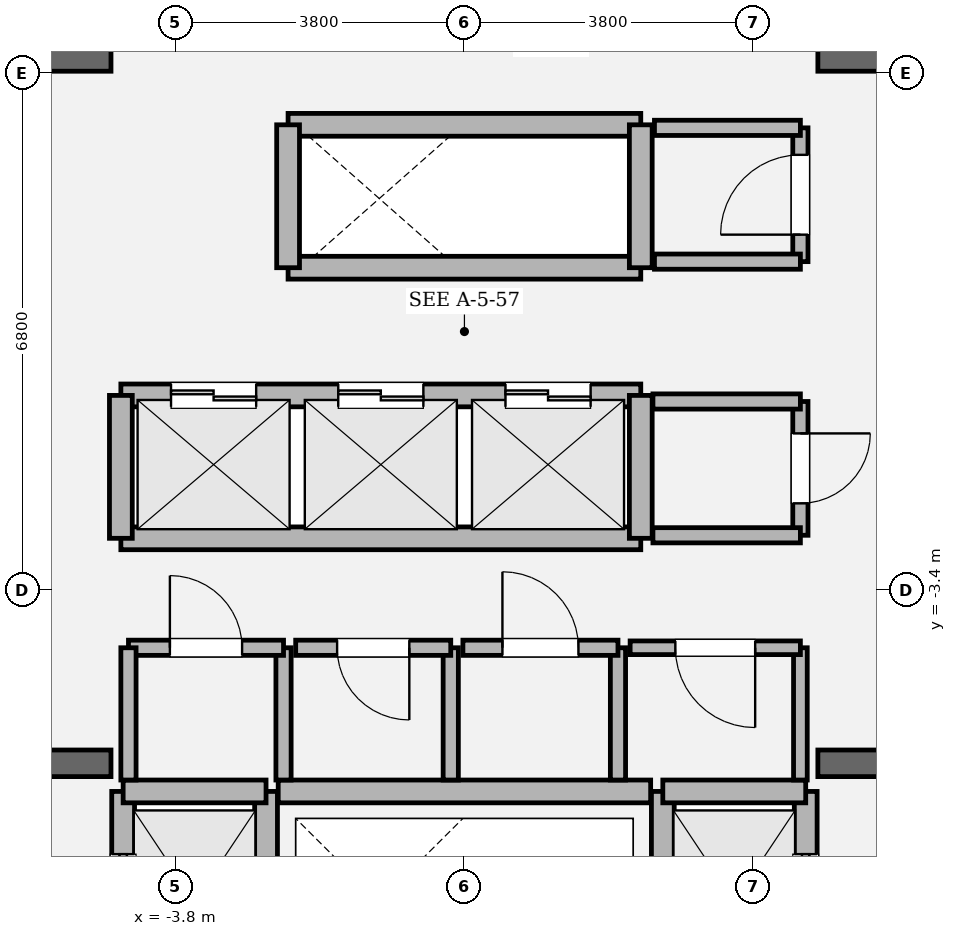
"""IFC4 building model, lengths in metres.
Left out: names, types, materials, properties, quantities, classifications, styles, units other than length and angle.
Written with IfcOpenShell. Run it as: python <this file> out.ifc"""

import sys

from ifc_helpers import new_model, si_unit, direction, frame, frame_2d, origin, place, context, subcontext, project, spatial, rectangle, extrude, element, fill, save


model = new_model("IFC4")
c1 = context("Model", 3, precision=1e-05, world=origin(), true_north=direction((0.0, 1.0)))
c2 = subcontext(c1, "Body", "Model", "MODEL_VIEW")
j1 = project(units=[si_unit("LENGTHUNIT", "METRE"), si_unit("PLANEANGLEUNIT", "RADIAN")], contexts=[c1])
p1 = place(None, origin())
s1 = spatial("IfcSite", under=j1, at=p1, CompositionType="ELEMENT")
p2 = place(p1, origin())
s2 = spatial("IfcBuilding", under=s1, at=p2, CompositionType="ELEMENT")
p3 = place(p2, frame((0.0, 0.0, 279.75)))
s3 = spatial("IfcBuildingStorey", under=s2, at=p3, CompositionType="ELEMENT", Elevation=279.75)
p4 = place(p3, frame((-9.925, -5.68, 0.0), z_axis=(0.0, 0.0, 1.0), x_axis=(1.0, 0.0, 0.0)))
e1 = element("IfcWall", 1, at=p4, inside=s3, PredefinedType="SOLIDWALL", context=c2, shape_type="SweptSolid", body=[
    extrude(rectangle(XDim=5.275, YDim=0.35, at=frame_2d((2.638, 0.0))), origin(), (0.0, 0.0, 1.0), 4.05),
])
p5 = place(p4, frame((1.385, 0.0, 0.0)))
e2 = element("IfcOpeningElement", 2, at=p5, cuts=e1, PredefinedType="OPENING", context=c2, shape_type="SweptSolid", body=[
    extrude(rectangle(XDim=1.18, YDim=2.2, at=frame_2d((0.59, 1.1))), frame((0.0, 0.185, 0.0), z_axis=(0.0, -1.0, 0.0), x_axis=(1.0, 0.0, 0.0)), (0.0, 0.0, 1.0), 0.37),
])
p6 = place(p3, frame((4.65, -5.68, 0.0), z_axis=(0.0, 0.0, 1.0), x_axis=(1.0, 0.0, 0.0)))
e3 = element("IfcWall", 3, at=p6, inside=s3, PredefinedType="SOLIDWALL", context=c2, shape_type="SweptSolid", body=[
    extrude(rectangle(XDim=5.275, YDim=0.35, at=frame_2d((2.638, 0.0))), origin(), (0.0, 0.0, 1.0), 4.05),
])
p7 = place(p6, frame((2.71, 0.0, 0.0)))
e4 = element("IfcOpeningElement", 4, at=p7, cuts=e3, PredefinedType="OPENING", context=c2, shape_type="SweptSolid", body=[
    extrude(rectangle(XDim=1.18, YDim=2.2, at=frame_2d((0.59, 1.1))), frame((0.0, 0.185, 0.0), z_axis=(0.0, -1.0, 0.0), x_axis=(1.0, 0.0, 0.0)), (0.0, 0.0, 1.0), 0.37),
])
for number, where, z_axis, x_axis in (
    (5, (-9.925, 3.6, 0.0), (0.0, 0.0, 1.0), (1.0, 0.0, 0.0)),
    (6, (4.65, 3.6, 0.0), (0.0, 0.0, 1.0), (1.0, 0.0, 0.0)),
):
    element("IfcWall", number, at=place(p3, frame(where, z_axis=z_axis, x_axis=x_axis)), inside=s3, PredefinedType="SOLIDWALL", context=c2, shape_type="SweptSolid", body=[
        extrude(rectangle(XDim=5.275, YDim=0.35, at=frame_2d((2.638, 0.0))), origin(), (0.0, 0.0, 1.0), 4.05),
    ])
p8 = place(p3, frame((-4.49, -8.82, 0.0), z_axis=(0.0, 0.0, 1.0), x_axis=(0.0, 1.0, 0.0)))
e7 = element("IfcWall", 7, at=p8, inside=s3, PredefinedType="SOLIDWALL", context=c2, shape_type="SweptSolid", body=[
    extrude(rectangle(XDim=2.77, YDim=0.3, at=frame_2d((1.385, 0.0))), origin(), (0.0, 0.0, 1.0), 3.77),
])
p9 = place(p8, frame((0.825, 0.0, 0.0)))
e8 = element("IfcOpeningElement", 8, at=p9, cuts=e7, PredefinedType="OPENING", context=c2, shape_type="SweptSolid", body=[
    extrude(rectangle(XDim=1.12, YDim=2.25, at=frame_2d((0.56, 1.125))), frame((0.0, 0.16, 0.0), z_axis=(0.0, -1.0, 0.0), x_axis=(1.0, 0.0, 0.0)), (0.0, 0.0, 1.0), 0.32),
])
p10 = place(p3, frame((-2.61, -8.82, 0.0), z_axis=(0.0, 0.0, 1.0), x_axis=(0.0, 1.0, 0.0)))
e9 = element("IfcWall", 9, at=p10, inside=s3, PredefinedType="SOLIDWALL", context=c2, shape_type="SweptSolid", body=[
    extrude(rectangle(XDim=2.77, YDim=0.3, at=frame_2d((1.385, 0.0))), origin(), (0.0, 0.0, 1.0), 3.77),
])
p11 = place(p3, frame((-4.49, -6.05, 0.0), z_axis=(0.0, 0.0, 1.0), x_axis=(1.0, 0.0, 0.0)))
e10 = element("IfcWall", 10, at=p11, inside=s3, PredefinedType="SOLIDWALL", context=c2, shape_type="SweptSolid", body=[
    extrude(rectangle(XDim=1.88, YDim=0.3, at=frame_2d((0.94, 0.0))), origin(), (0.0, 0.0, 1.0), 3.77),
])
p12 = place(p3, frame((4.49, -8.82, 0.0), z_axis=(0.0, 0.0, 1.0), x_axis=(0.0, 1.0, 0.0)))
e11 = element("IfcWall", 11, at=p12, inside=s3, PredefinedType="SOLIDWALL", context=c2, shape_type="SweptSolid", body=[
    extrude(rectangle(XDim=2.77, YDim=0.3, at=frame_2d((1.385, 0.0))), origin(), (0.0, 0.0, 1.0), 3.77),
])
p13 = place(p12, frame((0.825, 0.0, 0.0)))
e12 = element("IfcOpeningElement", 12, at=p13, cuts=e11, PredefinedType="OPENING", context=c2, shape_type="SweptSolid", body=[
    extrude(rectangle(XDim=1.12, YDim=2.25, at=frame_2d((0.56, 1.125))), frame((0.0, 0.16, 0.0), z_axis=(0.0, -1.0, 0.0), x_axis=(1.0, 0.0, 0.0)), (0.0, 0.0, 1.0), 0.32),
])
p14 = place(p3, frame((2.61, -8.82, 0.0), z_axis=(0.0, 0.0, 1.0), x_axis=(0.0, 1.0, 0.0)))
e13 = element("IfcWall", 13, at=p14, inside=s3, PredefinedType="SOLIDWALL", context=c2, shape_type="SweptSolid", body=[
    extrude(rectangle(XDim=2.77, YDim=0.3, at=frame_2d((1.385, 0.0))), origin(), (0.0, 0.0, 1.0), 3.77),
])
p15 = place(p3, frame((2.61, -6.05, 0.0), z_axis=(0.0, 0.0, 1.0), x_axis=(1.0, 0.0, 0.0)))
e14 = element("IfcWall", 14, at=p15, inside=s3, PredefinedType="SOLIDWALL", context=c2, shape_type="SweptSolid", body=[
    extrude(rectangle(XDim=1.88, YDim=0.3, at=frame_2d((0.94, 0.0))), origin(), (0.0, 0.0, 1.0), 3.77),
])
p16 = place(p3, frame((-4.52, -0.84, 0.0), z_axis=(0.0, 0.0, 1.0), x_axis=(1.0, 0.0, 0.0)))
e15 = element("IfcWall", 15, at=p16, inside=s3, PredefinedType="SOLIDWALL", context=c2, shape_type="SweptSolid", body=[
    extrude(rectangle(XDim=6.84, YDim=0.3, at=frame_2d((3.42, 0.0))), origin(), (0.0, 0.0, 1.0), 3.77),
])
p17 = place(p16, frame((0.66, 0.0, 0.0)))
e16 = element("IfcOpeningElement", 16, at=p17, cuts=e15, PredefinedType="OPENING", context=c2, shape_type="SweptSolid", body=[
    extrude(rectangle(XDim=1.12, YDim=2.25, at=frame_2d((0.56, 1.125))), frame((0.0, 0.16, 0.0), z_axis=(0.0, -1.0, 0.0), x_axis=(1.0, 0.0, 0.0)), (0.0, 0.0, 1.0), 0.32),
])
p18 = place(p16, frame((2.86, 0.0, 0.0)))
e17 = element("IfcOpeningElement", 17, at=p18, cuts=e15, PredefinedType="OPENING", context=c2, shape_type="SweptSolid", body=[
    extrude(rectangle(XDim=1.12, YDim=2.25, at=frame_2d((0.56, 1.125))), frame((0.0, 0.16, 0.0), z_axis=(0.0, -1.0, 0.0), x_axis=(1.0, 0.0, 0.0)), (0.0, 0.0, 1.0), 0.32),
])
p19 = place(p16, frame((5.06, 0.0, 0.0)))
e18 = element("IfcOpeningElement", 18, at=p19, cuts=e15, PredefinedType="OPENING", context=c2, shape_type="SweptSolid", body=[
    extrude(rectangle(XDim=1.12, YDim=2.25, at=frame_2d((0.56, 1.125))), frame((0.0, 0.16, 0.0), z_axis=(0.0, -1.0, 0.0), x_axis=(1.0, 0.0, 0.0)), (0.0, 0.0, 1.0), 0.32),
])
p20 = place(p3, frame((-4.52, -2.72, 0.0), z_axis=(0.0, 0.0, 1.0), x_axis=(1.0, 0.0, 0.0)))
e19 = element("IfcWall", 19, at=p20, inside=s3, PredefinedType="SOLIDWALL", context=c2, shape_type="SweptSolid", body=[
    extrude(rectangle(XDim=6.84, YDim=0.3, at=frame_2d((3.42, 0.0))), origin(), (0.0, 0.0, 1.0), 3.77),
])
for number, where, z_axis, x_axis in (
    (20, (-4.52, -2.72, 0.0), (0.0, 0.0, 1.0), (0.0, 1.0, 0.0)),
    (21, (2.32, -2.72, 0.0), (0.0, 0.0, 1.0), (0.0, 1.0, 0.0)),
):
    element("IfcWall", number, at=place(p3, frame(where, z_axis=z_axis, x_axis=x_axis)), inside=s3, PredefinedType="SOLIDWALL", context=c2, shape_type="SweptSolid", body=[
        extrude(rectangle(XDim=1.88, YDim=0.3, at=frame_2d((0.94, 0.0))), origin(), (0.0, 0.0, 1.0), 3.77),
    ])
for number, where, z_axis, x_axis in (
    (22, (-2.32, 0.84, 0.0), (0.0, 0.0, 1.0), (1.0, 0.0, 0.0)),
    (23, (-2.32, 2.72, 0.0), (0.0, 0.0, 1.0), (1.0, 0.0, 0.0)),
):
    element("IfcWall", number, at=place(p3, frame(where, z_axis=z_axis, x_axis=x_axis)), inside=s3, PredefinedType="SOLIDWALL", context=c2, shape_type="SweptSolid", body=[
        extrude(rectangle(XDim=4.64, YDim=0.3, at=frame_2d((2.32, 0.0))), origin(), (0.0, 0.0, 1.0), 3.77),
    ])
for number, where, z_axis, x_axis in (
    (24, (-2.32, 0.84, 0.0), (0.0, 0.0, 1.0), (0.0, 1.0, 0.0)),
    (25, (2.32, 0.84, 0.0), (0.0, 0.0, 1.0), (0.0, 1.0, 0.0)),
):
    element("IfcWall", number, at=place(p3, frame(where, z_axis=z_axis, x_axis=x_axis)), inside=s3, PredefinedType="SOLIDWALL", context=c2, shape_type="SweptSolid", body=[
        extrude(rectangle(XDim=1.88, YDim=0.3, at=frame_2d((0.94, 0.0))), origin(), (0.0, 0.0, 1.0), 3.77),
    ])
p21 = place(p3, frame((-2.45, -6.05, 0.0), z_axis=(0.0, 0.0, 1.0), x_axis=(1.0, 0.0, 0.0)))
e26 = element("IfcWall", 26, at=p21, inside=s3, PredefinedType="SOLIDWALL", context=c2, shape_type="SweptSolid", body=[
    extrude(rectangle(XDim=4.9, YDim=0.3, at=frame_2d((2.45, 0.0))), origin(), (0.0, 0.0, 1.0), 3.77),
])
p22 = place(p3, frame((-2.38, -5.9, 0.0), z_axis=(0.0, 0.0, 1.0), x_axis=(0.0, 1.0, 0.0)))
e27 = element("IfcWall", 27, at=p22, inside=s3, PredefinedType="SOLIDWALL", context=c2, shape_type="SweptSolid", body=[
    extrude(rectangle(XDim=1.74, YDim=0.2, at=frame_2d((0.87, 0.0))), origin(), (0.0, 0.0, 1.0), 3.77),
])
p23 = place(p3, frame((-2.38, -4.16, 0.0), z_axis=(0.0, 0.0, 1.0), x_axis=(-1.0, 0.0, 0.0)))
e28 = element("IfcWall", 28, at=p23, inside=s3, PredefinedType="SOLIDWALL", context=c2, shape_type="SweptSolid", body=[
    extrude(rectangle(XDim=2.04, YDim=0.2, at=frame_2d((1.02, 0.0))), origin(), (0.0, 0.0, 1.0), 3.77),
])
p24 = place(p23, frame((0.545, 0.0, 0.0)))
e29 = element("IfcOpeningElement", 29, at=p24, cuts=e28, PredefinedType="OPENING", context=c2, shape_type="SweptSolid", body=[
    extrude(rectangle(XDim=0.95, YDim=2.15, at=frame_2d((0.475, 1.075))), frame((0.0, 0.11, 0.0), z_axis=(0.0, -1.0, 0.0), x_axis=(1.0, 0.0, 0.0)), (0.0, 0.0, 1.0), 0.22),
])
for number, where, z_axis, x_axis in (
    (30, (-4.42, -4.16, 0.0), (0.0, 0.0, 1.0), (0.0, -1.0, 0.0)),
    (31, (-0.18, -5.9, 0.0), (0.0, 0.0, 1.0), (0.0, 1.0, 0.0)),
):
    element("IfcWall", number, at=place(p3, frame(where, z_axis=z_axis, x_axis=x_axis)), inside=s3, PredefinedType="SOLIDWALL", context=c2, shape_type="SweptSolid", body=[
        extrude(rectangle(XDim=1.74, YDim=0.2, at=frame_2d((0.87, 0.0))), origin(), (0.0, 0.0, 1.0), 3.77),
    ])
p25 = place(p3, frame((-0.18, -4.16, 0.0), z_axis=(0.0, 0.0, 1.0), x_axis=(-1.0, 0.0, 0.0)))
e32 = element("IfcWall", 32, at=p25, inside=s3, PredefinedType="SOLIDWALL", context=c2, shape_type="SweptSolid", body=[
    extrude(rectangle(XDim=2.04, YDim=0.2, at=frame_2d((1.02, 0.0))), origin(), (0.0, 0.0, 1.0), 3.77),
])
p26 = place(p25, frame((0.545, 0.0, 0.0)))
e33 = element("IfcOpeningElement", 33, at=p26, cuts=e32, PredefinedType="OPENING", context=c2, shape_type="SweptSolid", body=[
    extrude(rectangle(XDim=0.95, YDim=2.15, at=frame_2d((0.475, 1.075))), frame((0.0, 0.11, 0.0), z_axis=(0.0, -1.0, 0.0), x_axis=(1.0, 0.0, 0.0)), (0.0, 0.0, 1.0), 0.22),
])
p27 = place(p3, frame((2.02, -5.9, 0.0), z_axis=(0.0, 0.0, 1.0), x_axis=(0.0, 1.0, 0.0)))
e34 = element("IfcWall", 34, at=p27, inside=s3, PredefinedType="SOLIDWALL", context=c2, shape_type="SweptSolid", body=[
    extrude(rectangle(XDim=1.74, YDim=0.2, at=frame_2d((0.87, 0.0))), origin(), (0.0, 0.0, 1.0), 3.77),
])
p28 = place(p3, frame((2.02, -4.16, 0.0), z_axis=(0.0, 0.0, 1.0), x_axis=(-1.0, 0.0, 0.0)))
e35 = element("IfcWall", 35, at=p28, inside=s3, PredefinedType="SOLIDWALL", context=c2, shape_type="SweptSolid", body=[
    extrude(rectangle(XDim=2.04, YDim=0.2, at=frame_2d((1.02, 0.0))), origin(), (0.0, 0.0, 1.0), 3.77),
])
p29 = place(p28, frame((0.52, 0.0, 0.0)))
e36 = element("IfcOpeningElement", 36, at=p29, cuts=e35, PredefinedType="OPENING", context=c2, shape_type="SweptSolid", body=[
    extrude(rectangle(XDim=1.0, YDim=2.15, at=frame_2d((0.5, 1.075))), frame((0.0, 0.11, 0.0), z_axis=(0.0, -1.0, 0.0), x_axis=(1.0, 0.0, 0.0)), (0.0, 0.0, 1.0), 0.22),
])
p30 = place(p3, frame((4.42, -5.9, 0.0), z_axis=(0.0, 0.0, 1.0), x_axis=(0.0, 1.0, 0.0)))
e37 = element("IfcWall", 37, at=p30, inside=s3, PredefinedType="PARTITIONING", context=c2, shape_type="SweptSolid", body=[
    extrude(rectangle(XDim=1.74, YDim=0.18, at=frame_2d((0.87, 0.0))), origin(), (0.0, 0.0, 1.0), 3.77),
])
p31 = place(p3, frame((4.42, -4.16, 0.0), z_axis=(0.0, 0.0, 1.0), x_axis=(-1.0, 0.0, 0.0)))
e38 = element("IfcWall", 38, at=p31, inside=s3, PredefinedType="PARTITIONING", context=c2, shape_type="SweptSolid", body=[
    extrude(rectangle(XDim=2.24, YDim=0.18, at=frame_2d((1.12, 0.0))), origin(), (0.0, 0.0, 1.0), 3.77),
])
p32 = place(p31, frame((0.595, 0.0, 0.0)))
e39 = element("IfcOpeningElement", 39, at=p32, cuts=e38, PredefinedType="OPENING", context=c2, shape_type="SweptSolid", body=[
    extrude(rectangle(XDim=1.05, YDim=2.2, at=frame_2d((0.525, 1.1))), frame((0.0, 0.1, 0.0), z_axis=(0.0, -1.0, 0.0), x_axis=(1.0, 0.0, 0.0)), (0.0, 0.0, 1.0), 0.2),
])
p33 = place(p3, frame((4.42, -2.68, 0.0), z_axis=(0.0, 0.0, 1.0), x_axis=(0.0, 1.0, 0.0)))
e40 = element("IfcWall", 40, at=p33, inside=s3, PredefinedType="SOLIDWALL", context=c2, shape_type="SweptSolid", body=[
    extrude(rectangle(XDim=1.76, YDim=0.2, at=frame_2d((0.88, 0.0))), origin(), (0.0, 0.0, 1.0), 3.77),
])
p34 = place(p33, frame((0.42, 0.0, 0.0)))
e41 = element("IfcOpeningElement", 41, at=p34, cuts=e40, PredefinedType="OPENING", context=c2, shape_type="SweptSolid", body=[
    extrude(rectangle(XDim=0.92, YDim=2.1, at=frame_2d((0.46, 1.05))), frame((0.0, 0.11, 0.0), z_axis=(0.0, -1.0, 0.0), x_axis=(1.0, 0.0, 0.0)), (0.0, 0.0, 1.0), 0.22),
])
for number, where, z_axis, x_axis in (
    (42, (4.42, -0.92, 0.0), (0.0, 0.0, 1.0), (-1.0, 0.0, 0.0)),
    (43, (2.48, -2.68, 0.0), (0.0, 0.0, 1.0), (1.0, 0.0, 0.0)),
):
    element("IfcWall", number, at=place(p3, frame(where, z_axis=z_axis, x_axis=x_axis)), inside=s3, PredefinedType="SOLIDWALL", context=c2, shape_type="SweptSolid", body=[
        extrude(rectangle(XDim=1.94, YDim=0.2, at=frame_2d((0.97, 0.0))), origin(), (0.0, 0.0, 1.0), 3.77),
    ])
p35 = place(p3, frame((4.42, 0.92, 0.0), z_axis=(0.0, 0.0, 1.0), x_axis=(0.0, 1.0, 0.0)))
e44 = element("IfcWall", 44, at=p35, inside=s3, PredefinedType="SOLIDWALL", context=c2, shape_type="SweptSolid", body=[
    extrude(rectangle(XDim=1.76, YDim=0.2, at=frame_2d((0.88, 0.0))), origin(), (0.0, 0.0, 1.0), 3.77),
])
p36 = place(p35, frame((0.355, 0.0, 0.0)))
e45 = element("IfcOpeningElement", 45, at=p36, cuts=e44, PredefinedType="OPENING", context=c2, shape_type="SweptSolid", body=[
    extrude(rectangle(XDim=1.05, YDim=2.2, at=frame_2d((0.525, 1.1))), frame((0.0, 0.11, 0.0), z_axis=(0.0, -1.0, 0.0), x_axis=(1.0, 0.0, 0.0)), (0.0, 0.0, 1.0), 0.22),
])
for number, where, z_axis, x_axis in (
    (46, (4.42, 2.68, 0.0), (0.0, 0.0, 1.0), (-1.0, 0.0, 0.0)),
    (47, (2.5, 0.92, 0.0), (0.0, 0.0, 1.0), (1.0, 0.0, 0.0)),
):
    element("IfcWall", number, at=place(p3, frame(where, z_axis=z_axis, x_axis=x_axis)), inside=s3, PredefinedType="SOLIDWALL", context=c2, shape_type="SweptSolid", body=[
        extrude(rectangle(XDim=1.92, YDim=0.2, at=frame_2d((0.96, 0.0))), origin(), (0.0, 0.0, 1.0), 3.77),
    ])
p37 = place(p9, origin())
e48 = element("IfcDoor", 48, at=p37, inside=s3, OperationType="SLIDING_TO_LEFT", PredefinedType="DOOR", context=c2, shape_type="SweptSolid", body=[
    extrude(rectangle(XDim=1.12, YDim=2.25, at=frame_2d((0.56, 1.125))), frame((0.0, 0.025, 0.0), z_axis=(0.0, -1.0, 0.0), x_axis=(1.0, 0.0, 0.0)), (0.0, 0.0, 1.0), 0.05),
])
fill(e8, e48)
p38 = place(p13, origin())
e49 = element("IfcDoor", 49, at=p38, inside=s3, OperationType="SLIDING_TO_RIGHT", PredefinedType="DOOR", context=c2, shape_type="SweptSolid", body=[
    extrude(rectangle(XDim=1.12, YDim=2.25, at=frame_2d((0.56, 1.125))), frame((0.0, 0.025, 0.0), z_axis=(0.0, -1.0, 0.0), x_axis=(1.0, 0.0, 0.0)), (0.0, 0.0, 1.0), 0.05),
])
fill(e12, e49)
p39 = place(p17, origin())
e50 = element("IfcDoor", 50, at=p39, inside=s3, OperationType="DOUBLE_DOOR_SLIDING", PredefinedType="DOOR", context=c2, shape_type="SweptSolid", body=[
    extrude(rectangle(XDim=1.12, YDim=2.25, at=frame_2d((0.56, 1.125))), frame((0.0, 0.025, 0.0), z_axis=(0.0, -1.0, 0.0), x_axis=(1.0, 0.0, 0.0)), (0.0, 0.0, 1.0), 0.05),
])
fill(e16, e50)
p40 = place(p18, origin())
e51 = element("IfcDoor", 51, at=p40, inside=s3, OperationType="DOUBLE_DOOR_SLIDING", PredefinedType="DOOR", context=c2, shape_type="SweptSolid", body=[
    extrude(rectangle(XDim=1.12, YDim=2.25, at=frame_2d((0.56, 1.125))), frame((0.0, 0.025, 0.0), z_axis=(0.0, -1.0, 0.0), x_axis=(1.0, 0.0, 0.0)), (0.0, 0.0, 1.0), 0.05),
])
fill(e17, e51)
p41 = place(p19, origin())
e52 = element("IfcDoor", 52, at=p41, inside=s3, OperationType="DOUBLE_DOOR_SLIDING", PredefinedType="DOOR", context=c2, shape_type="SweptSolid", body=[
    extrude(rectangle(XDim=1.12, YDim=2.25, at=frame_2d((0.56, 1.125))), frame((0.0, 0.025, 0.0), z_axis=(0.0, -1.0, 0.0), x_axis=(1.0, 0.0, 0.0)), (0.0, 0.0, 1.0), 0.05),
])
fill(e18, e52)
p42 = place(p24, origin())
e53 = element("IfcDoor", 53, at=p42, inside=s3, OperationType="SINGLE_SWING_RIGHT", PredefinedType="DOOR", context=c2, shape_type="SweptSolid", body=[
    extrude(rectangle(XDim=0.95, YDim=2.15, at=frame_2d((0.475, 1.075))), frame((0.0, 0.025, 0.0), z_axis=(0.0, -1.0, 0.0), x_axis=(1.0, 0.0, 0.0)), (0.0, 0.0, 1.0), 0.05),
])
fill(e29, e53)
p43 = place(p26, origin())
e54 = element("IfcDoor", 54, at=p43, inside=s3, OperationType="SINGLE_SWING_LEFT", PredefinedType="DOOR", context=c2, shape_type="SweptSolid", body=[
    extrude(rectangle(XDim=0.95, YDim=2.15, at=frame_2d((0.475, 1.075))), frame((0.0, 0.025, 0.0), z_axis=(0.0, -1.0, 0.0), x_axis=(1.0, 0.0, 0.0)), (0.0, 0.0, 1.0), 0.05),
])
fill(e33, e54)
p44 = place(p29, origin())
e55 = element("IfcDoor", 55, at=p44, inside=s3, OperationType="SINGLE_SWING_RIGHT", PredefinedType="DOOR", context=c2, shape_type="SweptSolid", body=[
    extrude(rectangle(XDim=1.0, YDim=2.15, at=frame_2d((0.5, 1.075))), frame((0.0, 0.025, 0.0), z_axis=(0.0, -1.0, 0.0), x_axis=(1.0, 0.0, 0.0)), (0.0, 0.0, 1.0), 0.05),
])
fill(e36, e55)
p45 = place(p32, origin())
e56 = element("IfcDoor", 56, at=p45, inside=s3, OperationType="SINGLE_SWING_LEFT", PredefinedType="DOOR", context=c2, shape_type="SweptSolid", body=[
    extrude(rectangle(XDim=1.05, YDim=2.2, at=frame_2d((0.525, 1.1))), frame((0.0, 0.025, 0.0), z_axis=(0.0, -1.0, 0.0), x_axis=(1.0, 0.0, 0.0)), (0.0, 0.0, 1.0), 0.05),
])
fill(e39, e56)
p46 = place(p34, origin())
e57 = element("IfcDoor", 57, at=p46, inside=s3, OperationType="SINGLE_SWING_RIGHT", PredefinedType="DOOR", context=c2, shape_type="SweptSolid", body=[
    extrude(rectangle(XDim=0.92, YDim=2.1, at=frame_2d((0.46, 1.05))), frame((0.0, 0.025, 0.0), z_axis=(0.0, -1.0, 0.0), x_axis=(1.0, 0.0, 0.0)), (0.0, 0.0, 1.0), 0.05),
])
fill(e41, e57)
p47 = place(p36, origin())
e58 = element("IfcDoor", 58, at=p47, inside=s3, OperationType="SINGLE_SWING_LEFT", PredefinedType="DOOR", context=c2, shape_type="SweptSolid", body=[
    extrude(rectangle(XDim=1.05, YDim=2.2, at=frame_2d((0.525, 1.1))), frame((0.0, 0.025, 0.0), z_axis=(0.0, -1.0, 0.0), x_axis=(1.0, 0.0, 0.0)), (0.0, 0.0, 1.0), 0.05),
])
fill(e45, e58)
save(model, sys.argv[1])
